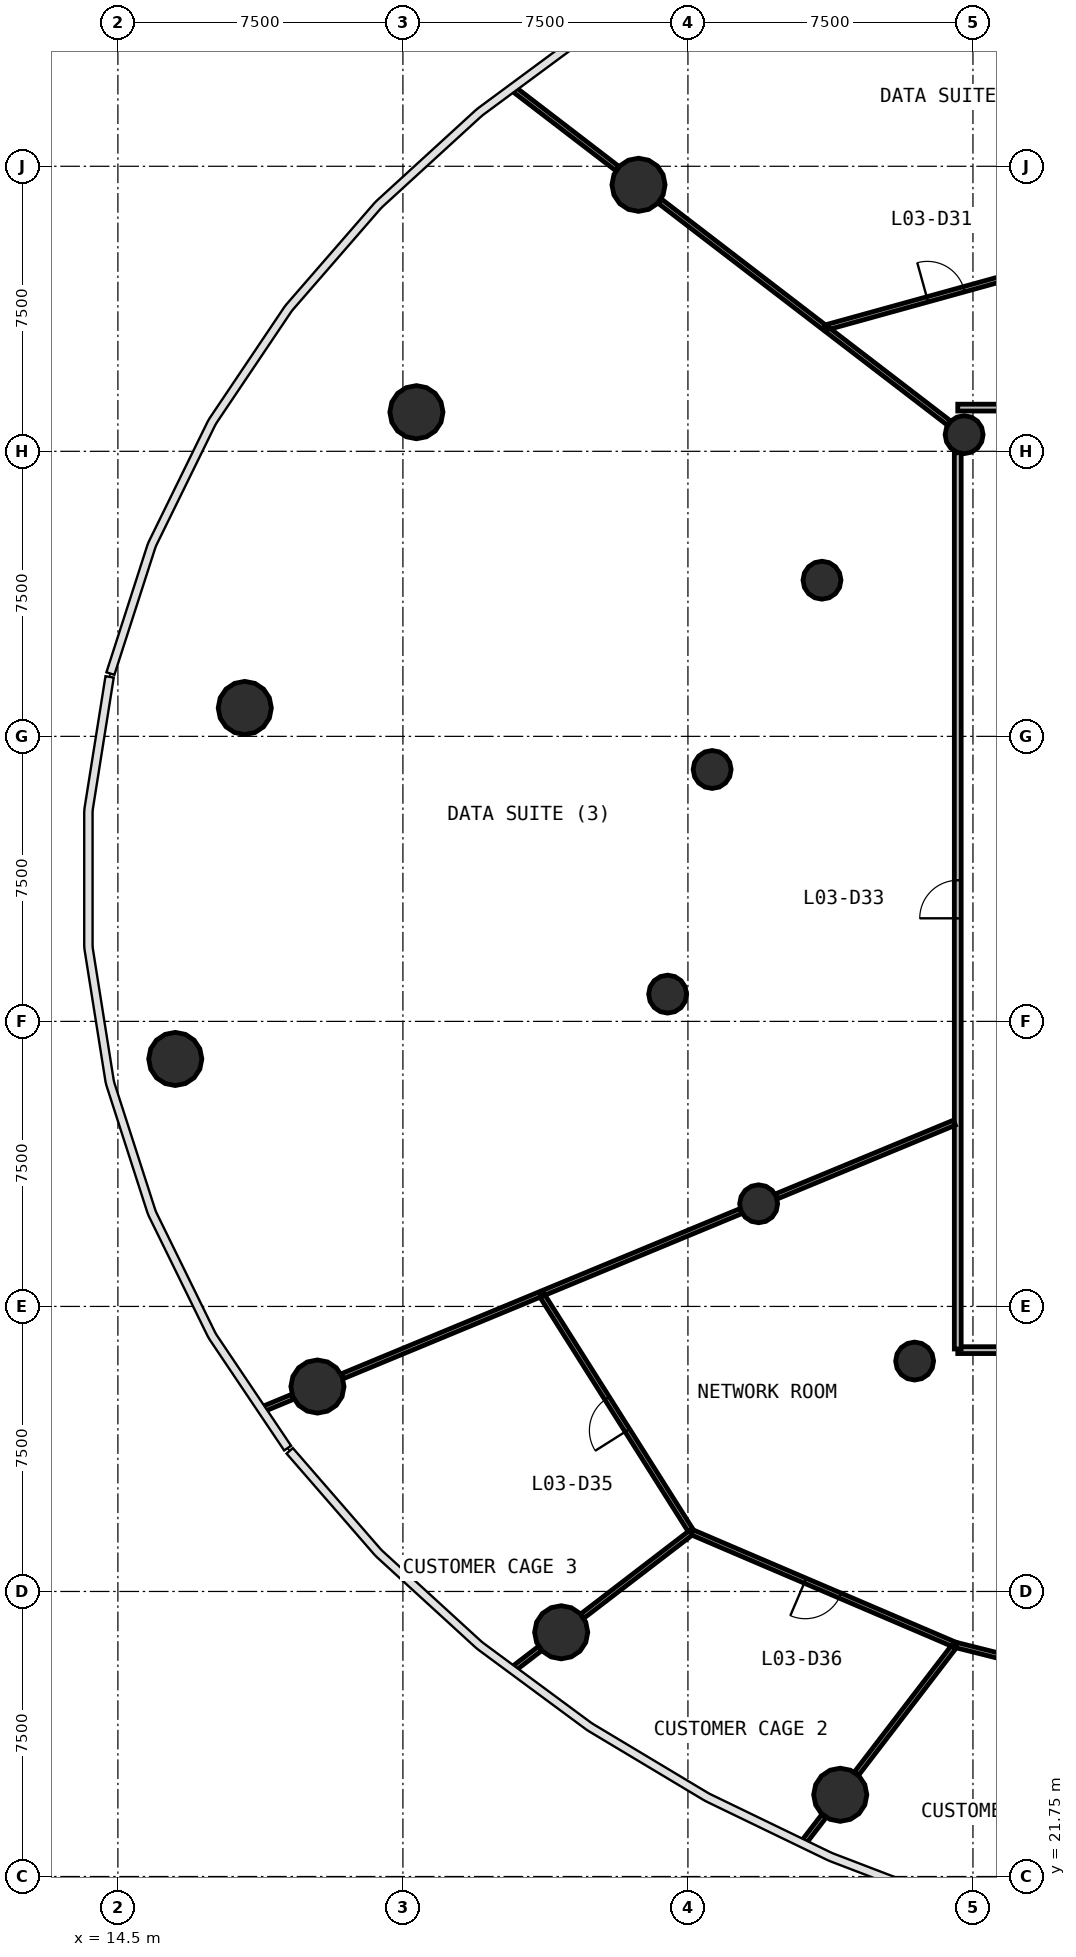
"""IFC4 building model, lengths in metres.
Left out: names, types, materials, properties, quantities, classifications, styles, units other than length and angle.
Written with IfcOpenShell. Run it as: python <this file> out.ifc"""

import sys

from ifc_helpers import new_model, si_unit, direction, frame, frame_2d, origin, origin_2d, place, context, subcontext, project, spatial, rectangle, circle, extrude, source, transform, mapped, element, fill, save


model = new_model("IFC4")
c1 = context("Model", 3, precision=1e-05, world=origin(), true_north=direction((0.0, 1.0)))
c2 = subcontext(c1, "Body", "Model", "MODEL_VIEW")
j1 = project(units=[si_unit("LENGTHUNIT", "METRE"), si_unit("PLANEANGLEUNIT", "RADIAN")], contexts=[c1])
p1 = place(None, origin())
s1 = spatial("IfcSite", under=j1, at=p1, CompositionType="ELEMENT")
p2 = place(p1, origin())
s2 = spatial("IfcBuilding", under=s1, at=p2, CompositionType="ELEMENT")
p3 = place(p2, frame((0.0, 0.0, 13.8)))
s3 = spatial("IfcBuildingStorey", under=s2, at=p3, CompositionType="ELEMENT", Elevation=13.8)
m1 = source(origin(), c2, "Body", "SweptSolid", [
    extrude(circle(Radius=0.7, at=origin_2d()), origin(), (0.0, 0.0, 1.0), 4.4),
])
for number, where, z_axis, x_axis in (
    (1, (28.199, 66.263, 0.0), (0.0, 0.0, 1.0), (1.0, 0.0, 0.0)),
    (2, (22.355, 60.279, 0.0), (0.0, 0.0, 1.0), (1.0, 0.0, 0.0)),
    (3, (17.839, 52.497, 0.0), (0.0, 0.0, 1.0), (1.0, 0.0, 0.0)),
    (4, (16.01, 43.262, 0.0), (0.0, 0.0, 1.0), (1.0, 0.0, 0.0)),
    (5, (19.751, 34.642, 0.0), (0.0, 0.0, 1.0), (1.0, 0.0, 0.0)),
    (6, (26.164, 28.176, 0.0), (0.0, 0.0, 1.0), (1.0, 0.0, 0.0)),
    (7, (33.508, 23.9, 0.0), (0.0, 0.0, 1.0), (1.0, 0.0, 0.0)),
):
    element("IfcColumn", number, at=place(p3, frame(where, z_axis=z_axis, x_axis=x_axis)), inside=s3, PredefinedType="COLUMN", context=c2, shape_type="MappedRepresentation", body=[
        mapped(m1, transform((0.0, 0.0, 0.0), scale=1.0)),
    ])
m2 = source(origin(), c2, "Body", "SweptSolid", [
    extrude(circle(Radius=0.5, at=origin_2d()), origin(), (0.0, 0.0, 1.0), 4.4),
])
for number, where, z_axis, x_axis in (
    (8, (36.768, 59.688, 0.0), (0.0, 0.0, 1.0), (1.0, 0.0, 0.0)),
    (9, (33.028, 55.859, 0.0), (0.0, 0.0, 1.0), (1.0, 0.0, 0.0)),
    (10, (30.137, 50.878, 0.0), (0.0, 0.0, 1.0), (1.0, 0.0, 0.0)),
    (11, (28.966, 44.968, 0.0), (0.0, 0.0, 1.0), (1.0, 0.0, 0.0)),
    (12, (31.361, 39.451, 0.0), (0.0, 0.0, 1.0), (1.0, 0.0, 0.0)),
    (13, (35.465, 35.312, 0.0), (0.0, 0.0, 1.0), (1.0, 0.0, 0.0)),
):
    element("IfcColumn", number, at=place(p3, frame(where, z_axis=z_axis, x_axis=x_axis)), inside=s3, PredefinedType="COLUMN", context=c2, shape_type="MappedRepresentation", body=[
        mapped(m2, transform((0.0, 0.0, 0.0), scale=1.0)),
    ])
p4 = place(p3, frame((67.4, 35.6, 0.0), z_axis=(0.0, 0.0, 1.0), x_axis=(-1.0, 0.0, 0.0)))
e14 = element("IfcWall", 14, at=p4, inside=s3, PredefinedType="PARTITIONING", context=c2, shape_type="SweptSolid", body=[
    extrude(rectangle(XDim=30.8, YDim=0.18, at=frame_2d((15.4, 0.0))), origin(), (0.0, 0.0, 1.0), 3.25),
])
p5 = place(p4, frame((20.95, 0.0, 0.0)))
e15 = element("IfcOpeningElement", 15, at=p5, cuts=e14, PredefinedType="OPENING", context=c2, shape_type="SweptSolid", body=[
    extrude(rectangle(XDim=1.0, YDim=2.1, at=frame_2d((0.5, 1.05))), frame((0.0, 0.1, 0.0), z_axis=(0.0, -1.0, 0.0), x_axis=(1.0, 0.0, 0.0)), (0.0, 0.0, 1.0), 0.2),
])
p6 = place(p4, frame((17.35, 0.0, 0.0)))
e16 = element("IfcOpeningElement", 16, at=p6, cuts=e14, PredefinedType="OPENING", context=c2, shape_type="SweptSolid", body=[
    extrude(rectangle(XDim=1.0, YDim=2.1, at=frame_2d((0.5, 1.05))), frame((0.0, 0.1, 0.0), z_axis=(0.0, -1.0, 0.0), x_axis=(1.0, 0.0, 0.0)), (0.0, 0.0, 1.0), 0.2),
])
p7 = place(p4, frame((14.95, 0.0, 0.0)))
e17 = element("IfcOpeningElement", 17, at=p7, cuts=e14, PredefinedType="OPENING", context=c2, shape_type="SweptSolid", body=[
    extrude(rectangle(XDim=1.0, YDim=2.1, at=frame_2d((0.5, 1.05))), frame((0.0, 0.1, 0.0), z_axis=(0.0, -1.0, 0.0), x_axis=(1.0, 0.0, 0.0)), (0.0, 0.0, 1.0), 0.2),
])
p8 = place(p3, frame((36.6, 60.4, 0.0), z_axis=(0.0, 0.0, 1.0), x_axis=(1.0, 0.0, 0.0)))
e18 = element("IfcWall", 18, at=p8, inside=s3, PredefinedType="PARTITIONING", context=c2, shape_type="SweptSolid", body=[
    extrude(rectangle(XDim=30.8, YDim=0.18, at=frame_2d((15.4, 0.0))), origin(), (0.0, 0.0, 1.0), 3.25),
])
p9 = place(p8, frame((17.35, 0.0, 0.0)))
e19 = element("IfcOpeningElement", 19, at=p9, cuts=e18, PredefinedType="OPENING", context=c2, shape_type="SweptSolid", body=[
    extrude(rectangle(XDim=1.0, YDim=2.1, at=frame_2d((0.5, 1.05))), frame((0.0, 0.1, 0.0), z_axis=(0.0, -1.0, 0.0), x_axis=(1.0, 0.0, 0.0)), (0.0, 0.0, 1.0), 0.2),
])
p10 = place(p8, frame((14.85, 0.0, 0.0)))
e20 = element("IfcOpeningElement", 20, at=p10, cuts=e18, PredefinedType="OPENING", context=c2, shape_type="SweptSolid", body=[
    extrude(rectangle(XDim=0.9, YDim=2.1, at=frame_2d((0.45, 1.05))), frame((0.0, 0.1, 0.0), z_axis=(0.0, -1.0, 0.0), x_axis=(1.0, 0.0, 0.0)), (0.0, 0.0, 1.0), 0.2),
])
p11 = place(p8, frame((12.65, 0.0, 0.0)))
e21 = element("IfcOpeningElement", 21, at=p11, cuts=e18, PredefinedType="OPENING", context=c2, shape_type="SweptSolid", body=[
    extrude(rectangle(XDim=0.9, YDim=2.1, at=frame_2d((0.45, 1.05))), frame((0.0, 0.1, 0.0), z_axis=(0.0, -1.0, 0.0), x_axis=(1.0, 0.0, 0.0)), (0.0, 0.0, 1.0), 0.2),
])
p12 = place(p8, frame((8.95, 0.0, 0.0)))
e22 = element("IfcOpeningElement", 22, at=p12, cuts=e18, PredefinedType="OPENING", context=c2, shape_type="SweptSolid", body=[
    extrude(rectangle(XDim=1.0, YDim=2.1, at=frame_2d((0.5, 1.05))), frame((0.0, 0.1, 0.0), z_axis=(0.0, -1.0, 0.0), x_axis=(1.0, 0.0, 0.0)), (0.0, 0.0, 1.0), 0.2),
])
p13 = place(p3, frame((36.6, 35.63, 0.0), z_axis=(0.0, 0.0, 1.0), x_axis=(0.0, 1.0, 0.0)))
e23 = element("IfcWall", 23, at=p13, inside=s3, PredefinedType="PARTITIONING", context=c2, shape_type="SweptSolid", body=[
    extrude(rectangle(XDim=23.583, YDim=0.18, at=frame_2d((11.791, 0.0))), origin(), (0.0, 0.0, 1.0), 3.25),
])
p14 = place(p13, frame((11.333, 0.0, 0.0)))
e24 = element("IfcOpeningElement", 24, at=p14, cuts=e23, PredefinedType="OPENING", context=c2, shape_type="SweptSolid", body=[
    extrude(rectangle(XDim=1.0, YDim=2.1, at=frame_2d((0.5, 1.05))), frame((0.0, 0.1, 0.0), z_axis=(0.0, -1.0, 0.0), x_axis=(1.0, 0.0, 0.0)), (0.0, 0.0, 1.0), 0.2),
])
p15 = place(p3, frame((36.535, 27.845, 0.0), z_axis=(0.0, 0.0, 1.0), x_axis=(-0.919481175992, 0.393134031847, 0.0)))
e25 = element("IfcWall", 25, at=p15, inside=s3, PredefinedType="PARTITIONING", context=c2, shape_type="SweptSolid", body=[
    extrude(rectangle(XDim=7.543, YDim=0.14, at=frame_2d((3.772, 0.0))), origin(), (0.0, 0.0, 1.0), 3.25),
])
p16 = place(p15, frame((3.293, 0.0, 0.0)))
e26 = element("IfcOpeningElement", 26, at=p16, cuts=e25, PredefinedType="OPENING", context=c2, shape_type="SweptSolid", body=[
    extrude(rectangle(XDim=1.0, YDim=2.1, at=frame_2d((0.5, 1.05))), frame((0.0, 0.08, 0.0), z_axis=(0.0, -1.0, 0.0), x_axis=(1.0, 0.0, 0.0)), (0.0, 0.0, 1.0), 0.16),
])
p17 = place(p3, frame((29.583, 30.836, 0.0), z_axis=(0.0, 0.0, 1.0), x_axis=(-0.534385893392, 0.845240626652, 0.0)))
e27 = element("IfcWall", 27, at=p17, inside=s3, PredefinedType="PARTITIONING", context=c2, shape_type="SweptSolid", body=[
    extrude(rectangle(XDim=7.386, YDim=0.14, at=frame_2d((3.693, 0.0))), origin(), (0.0, 0.0, 1.0), 3.25),
])
p18 = place(p17, frame((3.136, 0.0, 0.0)))
e28 = element("IfcOpeningElement", 28, at=p18, cuts=e27, PredefinedType="OPENING", context=c2, shape_type="SweptSolid", body=[
    extrude(rectangle(XDim=1.0, YDim=2.1, at=frame_2d((0.5, 1.05))), frame((0.0, 0.08, 0.0), z_axis=(0.0, -1.0, 0.0), x_axis=(1.0, 0.0, 0.0)), (0.0, 0.0, 1.0), 0.16),
])
p19 = place(p3, frame((33.102, 62.501, 0.0), z_axis=(0.0, 0.0, 1.0), x_axis=(0.963795064715, 0.266644094687, 0.0)))
e29 = element("IfcWall", 29, at=p19, inside=s3, PredefinedType="PARTITIONING", context=c2, shape_type="SweptSolid", body=[
    extrude(rectangle(XDim=6.651, YDim=0.14, at=frame_2d((3.325, 0.0))), origin(), (0.0, 0.0, 1.0), 3.25),
])
p20 = place(p19, frame((2.801, 0.0, 0.0)))
e30 = element("IfcOpeningElement", 30, at=p20, cuts=e29, PredefinedType="OPENING", context=c2, shape_type="SweptSolid", body=[
    extrude(rectangle(XDim=1.0, YDim=2.1, at=frame_2d((0.5, 1.05))), frame((0.0, 0.08, 0.0), z_axis=(0.0, -1.0, 0.0), x_axis=(1.0, 0.0, 0.0)), (0.0, 0.0, 1.0), 0.16),
])
p21 = place(p3, frame((42.983, 26.23, 0.0), z_axis=(0.0, 0.0, 1.0), x_axis=(-0.970027362967, 0.242995710034, 0.0)))
e31 = element("IfcWall", 31, at=p21, inside=s3, PredefinedType="PARTITIONING", context=c2, shape_type="SweptSolid", body=[
    extrude(rectangle(XDim=6.617, YDim=0.14, at=frame_2d((3.309, 0.0))), origin(), (0.0, 0.0, 1.0), 3.25),
])
p22 = place(p21, frame((2.767, 0.0, 0.0)))
e32 = element("IfcOpeningElement", 32, at=p22, cuts=e31, PredefinedType="OPENING", context=c2, shape_type="SweptSolid", body=[
    extrude(rectangle(XDim=1.0, YDim=2.1, at=frame_2d((0.5, 1.05))), frame((0.0, 0.08, 0.0), z_axis=(0.0, -1.0, 0.0), x_axis=(1.0, 0.0, 0.0)), (0.0, 0.0, 1.0), 0.16),
])
p23 = place(p3, frame((30.894, 39.258, 0.0), z_axis=(0.0, 0.0, 1.0), x_axis=(-0.923862765396, -0.382723909253, 0.0)))
e33 = element("IfcWall", 33, at=p23, inside=s3, PredefinedType="PARTITIONING", context=c2, shape_type="SweptSolid", body=[
    extrude(rectangle(XDim=5.621, YDim=0.14, at=frame_2d((2.81, 0.0))), origin(), (0.0, 0.0, 1.0), 3.25),
])
p24 = place(p3, frame((25.608, 37.068, 0.0), z_axis=(0.0, 0.0, 1.0), x_axis=(-0.92387741194, -0.382688551836, 0.0)))
e34 = element("IfcWall", 34, at=p24, inside=s3, PredefinedType="PARTITIONING", context=c2, shape_type="SweptSolid", body=[
    extrude(rectangle(XDim=5.635, YDim=0.14, at=frame_2d((2.817, 0.0))), origin(), (0.0, 0.0, 1.0), 3.25),
])
p25 = place(p3, frame((33.078, 62.519, 0.0), z_axis=(0.0, 0.0, 1.0), x_axis=(-0.793366729699, 0.608743979196, 0.0)))
e35 = element("IfcWall", 35, at=p25, inside=s3, PredefinedType="PARTITIONING", context=c2, shape_type="SweptSolid", body=[
    extrude(rectangle(XDim=5.446, YDim=0.14, at=frame_2d((2.723, 0.0))), origin(), (0.0, 0.0, 1.0), 3.25),
])
p26 = place(p3, frame((36.51, 41.584, 0.0), z_axis=(0.0, 0.0, 1.0), x_axis=(-0.923890025086, -0.382658100067, 0.0)))
e36 = element("IfcWall", 36, at=p26, inside=s3, PredefinedType="PARTITIONING", context=c2, shape_type="SweptSolid", body=[
    extrude(rectangle(XDim=5.068, YDim=0.14, at=frame_2d((2.534, 0.0))), origin(), (0.0, 0.0, 1.0), 3.25),
])
p27 = place(p3, frame((36.491, 27.788, 0.0), z_axis=(0.0, 0.0, 1.0), x_axis=(-0.608788130652, -0.793332850686, 0.0)))
e37 = element("IfcWall", 37, at=p27, inside=s3, PredefinedType="PARTITIONING", context=c2, shape_type="SweptSolid", body=[
    extrude(rectangle(XDim=4.196, YDim=0.14, at=frame_2d((2.098, 0.0))), origin(), (0.0, 0.0, 1.0), 3.25),
])
p28 = place(p3, frame((36.367, 59.995, 0.0), z_axis=(0.0, 0.0, 1.0), x_axis=(-0.793362422365, 0.608749592837, 0.0)))
e38 = element("IfcWall", 38, at=p28, inside=s3, PredefinedType="PARTITIONING", context=c2, shape_type="SweptSolid", body=[
    extrude(rectangle(XDim=4.028, YDim=0.14, at=frame_2d((2.014, 0.0))), origin(), (0.0, 0.0, 1.0), 3.25),
])
p29 = place(p3, frame((29.575, 30.793, 0.0), z_axis=(0.0, 0.0, 1.0), x_axis=(-0.793358147318, -0.608755164319, 0.0)))
e39 = element("IfcWall", 39, at=p29, inside=s3, PredefinedType="PARTITIONING", context=c2, shape_type="SweptSolid", body=[
    extrude(rectangle(XDim=3.594, YDim=0.14, at=frame_2d((1.797, 0.0))), origin(), (0.0, 0.0, 1.0), 3.25),
])
p30 = place(p3, frame((27.641, 66.691, 0.0), z_axis=(0.0, 0.0, 1.0), x_axis=(-0.793332688102, 0.60878834252, 0.0)))
e40 = element("IfcWall", 40, at=p30, inside=s3, PredefinedType="PARTITIONING", context=c2, shape_type="SweptSolid", body=[
    extrude(rectangle(XDim=3.404, YDim=0.14, at=frame_2d((1.702, 0.0))), origin(), (0.0, 0.0, 1.0), 3.25),
])
p31 = place(p3, frame((25.606, 27.747, 0.0), z_axis=(0.0, 0.0, 1.0), x_axis=(-0.793456422987, -0.608627065468, 0.0)))
e41 = element("IfcWall", 41, at=p31, inside=s3, PredefinedType="PARTITIONING", context=c2, shape_type="SweptSolid", body=[
    extrude(rectangle(XDim=0.839, YDim=0.14, at=frame_2d((0.419, 0.0))), origin(), (0.0, 0.0, 1.0), 3.25),
])
p32 = place(p3, frame((33.079, 23.342, 0.0), z_axis=(0.0, 0.0, 1.0), x_axis=(-0.608939798959, -0.793216440351, 0.0)))
e42 = element("IfcWall", 42, at=p32, inside=s3, PredefinedType="PARTITIONING", context=c2, shape_type="SweptSolid", body=[
    extrude(rectangle(XDim=0.827, YDim=0.14, at=frame_2d((0.413, 0.0))), origin(), (0.0, 0.0, 1.0), 3.25),
])
p33 = place(p3, frame((19.1, 34.372, 0.0), z_axis=(0.0, 0.0, 1.0), x_axis=(-0.923882954879, -0.382675169935, 0.0)))
e43 = element("IfcWall", 43, at=p33, inside=s3, PredefinedType="PARTITIONING", context=c2, shape_type="SweptSolid", body=[
    extrude(rectangle(XDim=0.822, YDim=0.14, at=frame_2d((0.411, 0.0))), origin(), (0.0, 0.0, 1.0), 3.25),
])
m3 = source(origin(), c2, "Body", "SweptSolid", [
    extrude(rectangle(XDim=1.0, YDim=2.1, at=frame_2d((0.5, 1.05))), frame((0.0, 0.025, 0.0), z_axis=(0.0, -1.0, 0.0), x_axis=(1.0, 0.0, 0.0)), (0.0, 0.0, 1.0), 0.05),
])
p34 = place(p20, origin())
e44 = element("IfcDoor", 44, at=p34, inside=s3, OperationType="SINGLE_SWING_LEFT", PredefinedType="DOOR", context=c2, shape_type="MappedRepresentation", body=[
    mapped(m3, transform((0.0, 0.0, 0.0), scale=1.0)),
])
fill(e30, e44)
p35 = place(p14, origin())
e45 = element("IfcDoor", 45, at=p35, inside=s3, OperationType="SINGLE_SWING_LEFT", PredefinedType="DOOR", context=c2, shape_type="MappedRepresentation", body=[
    mapped(m3, transform((0.0, 0.0, 0.0), scale=1.0)),
])
fill(e24, e45)
p36 = place(p18, origin())
e46 = element("IfcDoor", 46, at=p36, inside=s3, OperationType="SINGLE_SWING_LEFT", PredefinedType="DOOR", context=c2, shape_type="MappedRepresentation", body=[
    mapped(m3, transform((0.0, 0.0, 0.0), scale=1.0)),
])
fill(e28, e46)
p37 = place(p16, origin())
e47 = element("IfcDoor", 47, at=p37, inside=s3, OperationType="SINGLE_SWING_RIGHT", PredefinedType="DOOR", context=c2, shape_type="MappedRepresentation", body=[
    mapped(m3, transform((0.0, 0.0, 0.0), scale=1.0)),
])
fill(e26, e47)
save(model, sys.argv[1])
